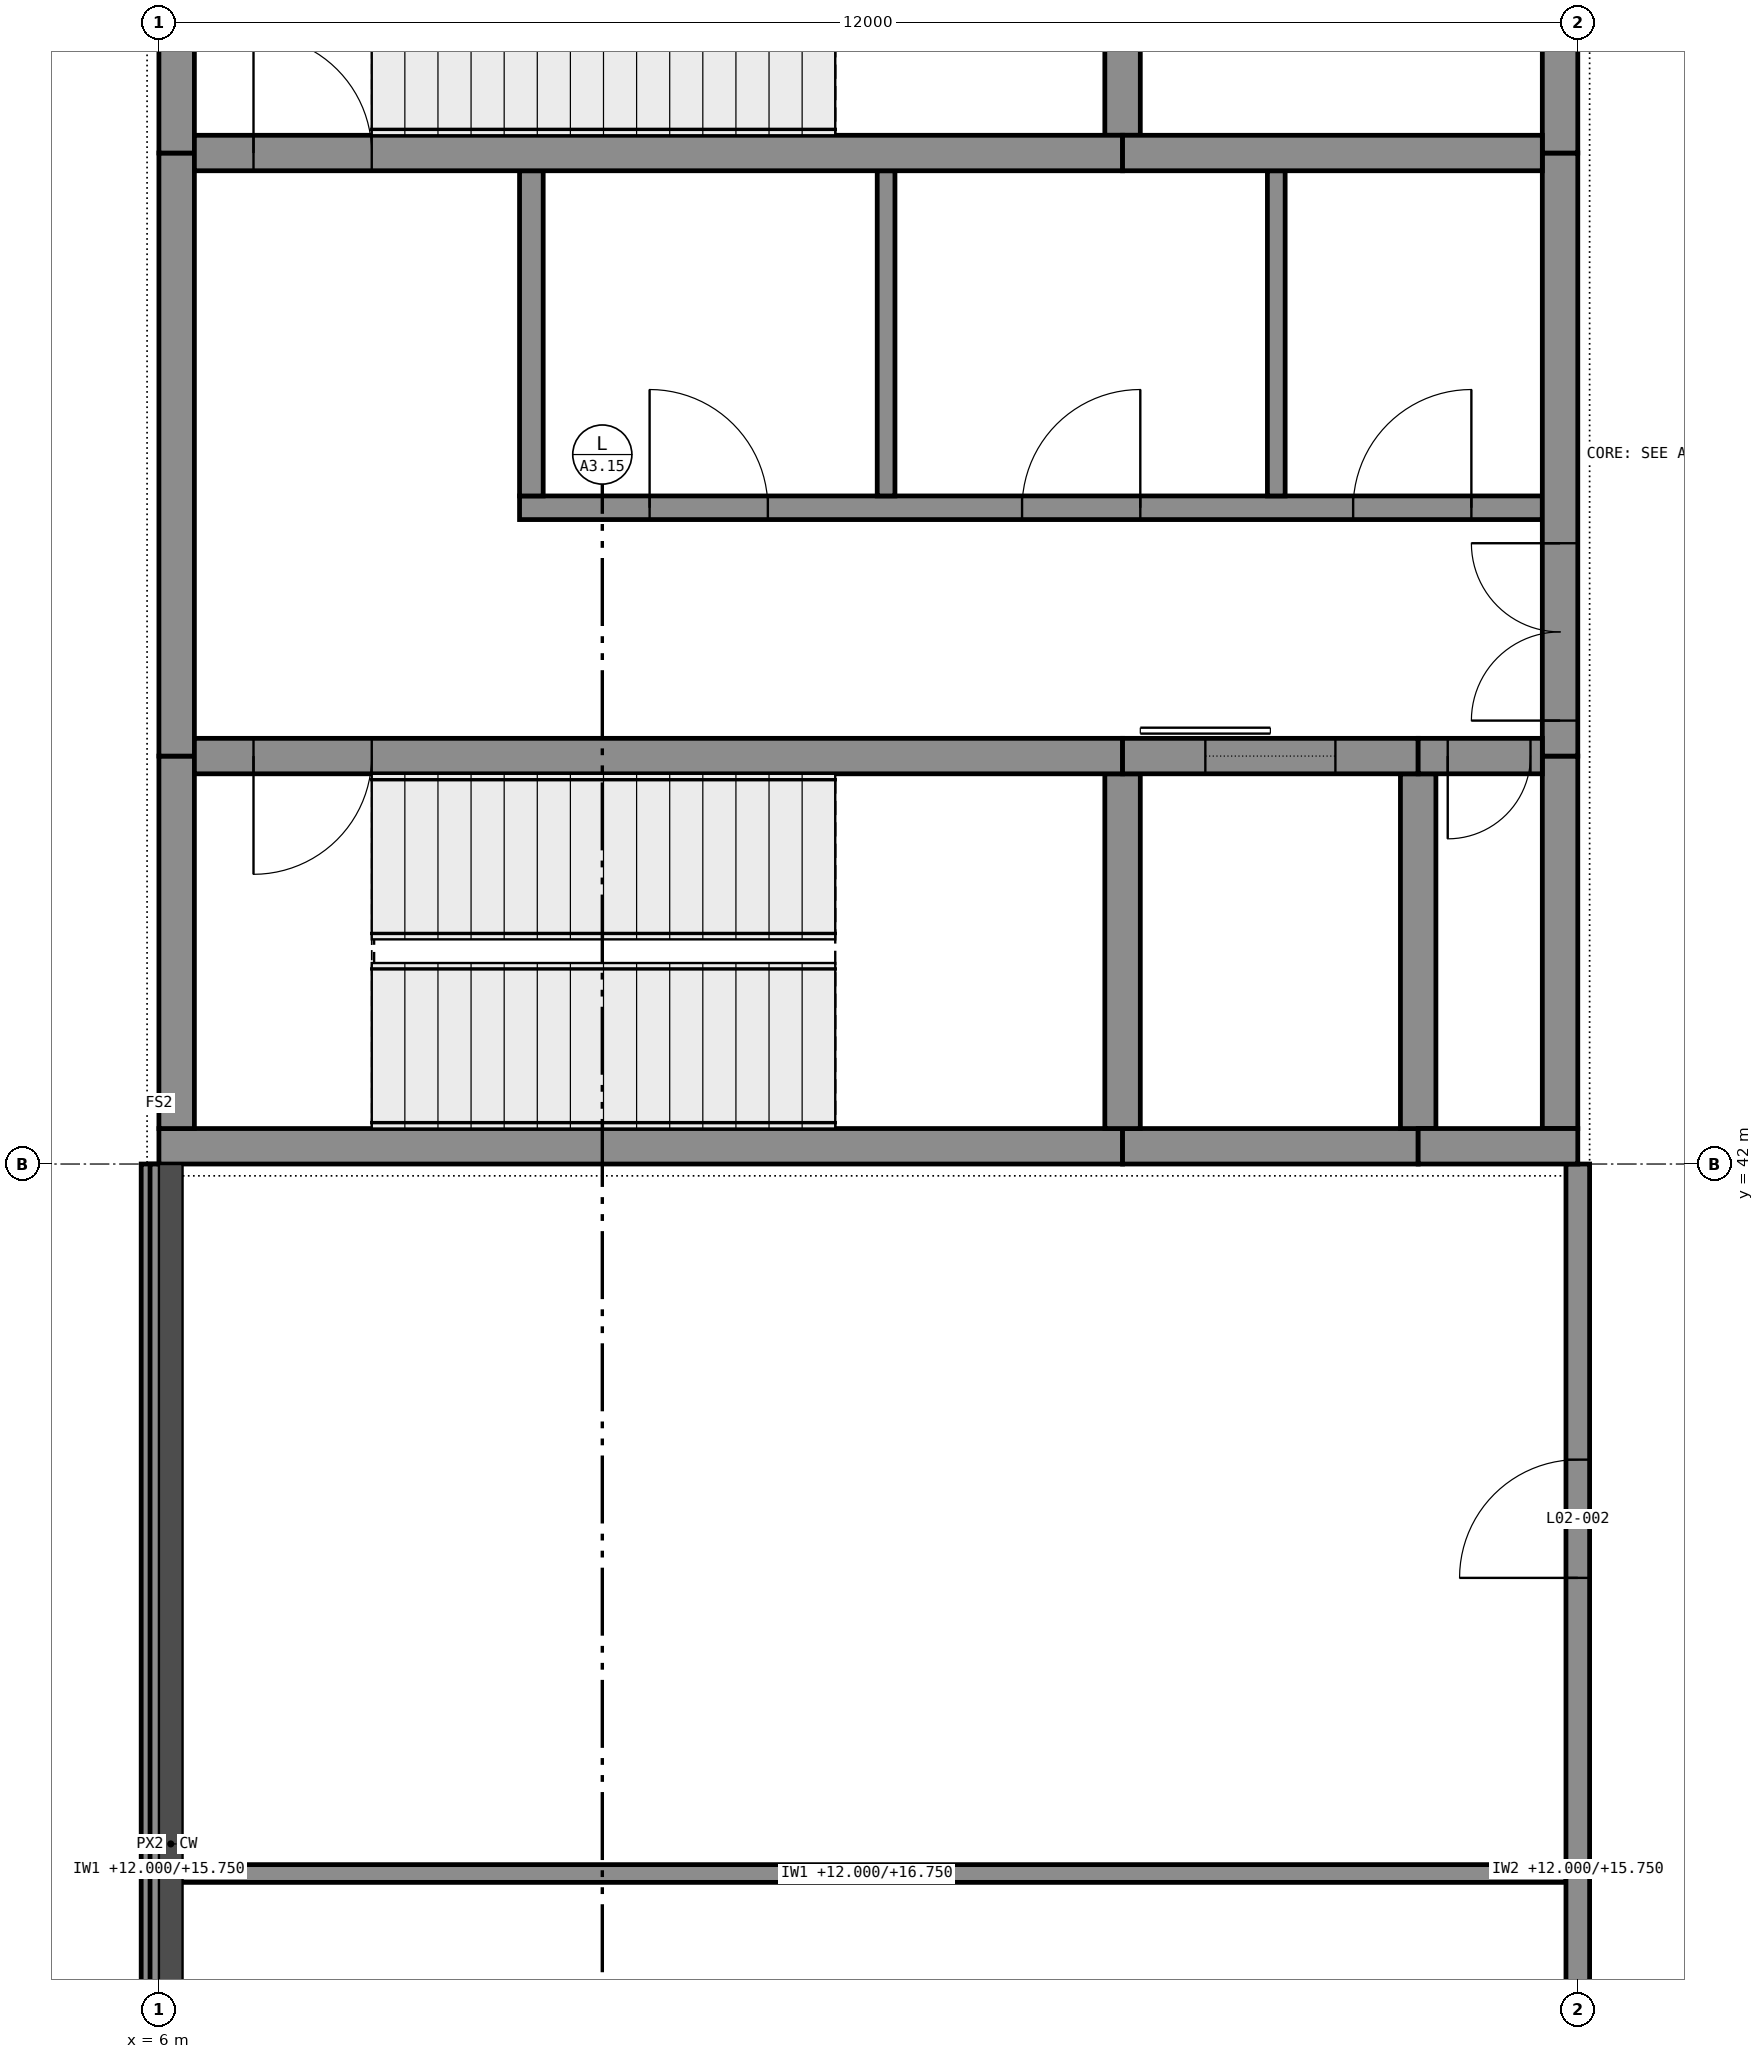
"""IFC4 building model, lengths in metres.
Left out: names, types, materials, properties, quantities, classifications, styles, units other than length and angle.
Written with IfcOpenShell. Run it as: python <this file> out.ifc"""

import sys

from ifc_helpers import new_model, si_unit, direction, frame, frame_2d, origin, place, context, subcontext, project, spatial, rectangle, extrude, element, fill, save


model = new_model("IFC4")
c1 = context("Model", 3, precision=1e-05, world=origin(), true_north=direction((0.0, 1.0)))
c2 = subcontext(c1, "Body", "Model", "MODEL_VIEW")
j1 = project(units=[si_unit("LENGTHUNIT", "METRE"), si_unit("PLANEANGLEUNIT", "RADIAN")], contexts=[c1])
p1 = place(None, origin())
s1 = spatial("IfcSite", under=j1, at=p1, CompositionType="ELEMENT")
p2 = place(p1, origin())
s2 = spatial("IfcBuilding", under=s1, at=p2, CompositionType="ELEMENT")
p3 = place(p2, frame((0.0, 0.0, 12.0)))
s3 = spatial("IfcBuildingStorey", under=s2, at=p3, CompositionType="ELEMENT", Elevation=12.0)
p4 = place(p3, frame((6.0, 42.15, 0.0), z_axis=(0.0, 0.0, 1.0), x_axis=(1.0, 0.0, 0.0)))
e1 = element("IfcWall", 1, at=p4, inside=s3, PredefinedType="SHEAR", context=c2, shape_type="SweptSolid", body=[
    extrude(rectangle(XDim=8.15, YDim=0.3, at=frame_2d((4.075, 0.0))), origin(), (0.0, 0.0, 1.0), 4.75),
])
p5 = place(p3, frame((14.15, 42.15, 0.0), z_axis=(0.0, 0.0, 1.0), x_axis=(1.0, 0.0, 0.0)))
e2 = element("IfcWall", 2, at=p5, inside=s3, PredefinedType="SHEAR", context=c2, shape_type="SweptSolid", body=[
    extrude(rectangle(XDim=2.5, YDim=0.3, at=frame_2d((1.25, 0.0))), origin(), (0.0, 0.0, 1.0), 4.75),
])
p6 = place(p3, frame((16.65, 42.15, 0.0), z_axis=(0.0, 0.0, 1.0), x_axis=(1.0, 0.0, 0.0)))
e3 = element("IfcWall", 3, at=p6, inside=s3, PredefinedType="SHEAR", context=c2, shape_type="SweptSolid", body=[
    extrude(rectangle(XDim=1.35, YDim=0.3, at=frame_2d((0.675, 0.0))), origin(), (0.0, 0.0, 1.0), 4.75),
])
p7 = place(p3, frame((6.3, 45.45, 0.0), z_axis=(0.0, 0.0, 1.0), x_axis=(1.0, 0.0, 0.0)))
e4 = element("IfcWall", 4, at=p7, inside=s3, PredefinedType="SHEAR", context=c2, shape_type="SweptSolid", body=[
    extrude(rectangle(XDim=7.85, YDim=0.3, at=frame_2d((3.925, 0.0))), origin(), (0.0, 0.0, 1.0), 4.75),
])
p8 = place(p7, frame((0.5, 0.0, 0.0)))
e5 = element("IfcOpeningElement", 5, at=p8, cuts=e4, PredefinedType="OPENING", context=c2, shape_type="SweptSolid", body=[
    extrude(rectangle(XDim=1.0, YDim=2.1, at=frame_2d((0.5, 1.05))), frame((0.0, 0.16, 0.0), z_axis=(0.0, -1.0, 0.0), x_axis=(1.0, 0.0, 0.0)), (0.0, 0.0, 1.0), 0.32),
])
p9 = place(p3, frame((14.15, 45.45, 0.0), z_axis=(0.0, 0.0, 1.0), x_axis=(1.0, 0.0, 0.0)))
e6 = element("IfcWall", 6, at=p9, inside=s3, PredefinedType="SHEAR", context=c2, shape_type="SweptSolid", body=[
    extrude(rectangle(XDim=2.5, YDim=0.3, at=frame_2d((1.25, 0.0))), origin(), (0.0, 0.0, 1.0), 4.75),
])
p10 = place(p9, frame((0.7, 0.0, 0.0)))
e7 = element("IfcOpeningElement", 7, at=p10, cuts=e6, PredefinedType="OPENING", context=c2, shape_type="SweptSolid", body=[
    extrude(rectangle(XDim=1.1, YDim=2.1, at=frame_2d((0.55, 1.05))), frame((0.0, 0.16, 0.0), z_axis=(0.0, -1.0, 0.0), x_axis=(1.0, 0.0, 0.0)), (0.0, 0.0, 1.0), 0.32),
])
p11 = place(p3, frame((16.65, 45.45, 0.0), z_axis=(0.0, 0.0, 1.0), x_axis=(1.0, 0.0, 0.0)))
e8 = element("IfcWall", 8, at=p11, inside=s3, PredefinedType="SHEAR", context=c2, shape_type="SweptSolid", body=[
    extrude(rectangle(XDim=1.05, YDim=0.3, at=frame_2d((0.525, 0.0))), origin(), (0.0, 0.0, 1.0), 4.75),
])
p12 = place(p11, frame((0.25, 0.0, 0.0)))
e9 = element("IfcOpeningElement", 9, at=p12, cuts=e8, PredefinedType="OPENING", context=c2, shape_type="SweptSolid", body=[
    extrude(rectangle(XDim=0.7, YDim=2.1, at=frame_2d((0.35, 1.05))), frame((0.0, 0.16, 0.0), z_axis=(0.0, -1.0, 0.0), x_axis=(1.0, 0.0, 0.0)), (0.0, 0.0, 1.0), 0.32),
])
p13 = place(p3, frame((6.3, 50.55, 0.0), z_axis=(0.0, 0.0, 1.0), x_axis=(1.0, 0.0, 0.0)))
e10 = element("IfcWall", 10, at=p13, inside=s3, PredefinedType="SHEAR", context=c2, shape_type="SweptSolid", body=[
    extrude(rectangle(XDim=7.85, YDim=0.3, at=frame_2d((3.925, 0.0))), origin(), (0.0, 0.0, 1.0), 4.75),
])
p14 = place(p13, frame((0.5, 0.0, 0.0)))
e11 = element("IfcOpeningElement", 11, at=p14, cuts=e10, PredefinedType="OPENING", context=c2, shape_type="SweptSolid", body=[
    extrude(rectangle(XDim=1.0, YDim=2.1, at=frame_2d((0.5, 1.05))), frame((0.0, 0.16, 0.0), z_axis=(0.0, -1.0, 0.0), x_axis=(1.0, 0.0, 0.0)), (0.0, 0.0, 1.0), 0.32),
])
p15 = place(p3, frame((14.15, 50.55, 0.0), z_axis=(0.0, 0.0, 1.0), x_axis=(1.0, 0.0, 0.0)))
e12 = element("IfcWall", 12, at=p15, inside=s3, PredefinedType="SHEAR", context=c2, shape_type="SweptSolid", body=[
    extrude(rectangle(XDim=3.55, YDim=0.3, at=frame_2d((1.775, 0.0))), origin(), (0.0, 0.0, 1.0), 4.75),
])
p16 = place(p3, frame((6.15, 42.3, 0.0), z_axis=(0.0, 0.0, 1.0), x_axis=(0.0, 1.0, 0.0)))
e13 = element("IfcWall", 13, at=p16, inside=s3, PredefinedType="SHEAR", context=c2, shape_type="SweptSolid", body=[
    extrude(rectangle(XDim=3.15, YDim=0.3, at=frame_2d((1.575, 0.0))), origin(), (0.0, 0.0, 1.0), 4.75),
])
p17 = place(p3, frame((6.15, 45.45, 0.0), z_axis=(0.0, 0.0, 1.0), x_axis=(0.0, 1.0, 0.0)))
e14 = element("IfcWall", 14, at=p17, inside=s3, PredefinedType="SHEAR", context=c2, shape_type="SweptSolid", body=[
    extrude(rectangle(XDim=5.1, YDim=0.3, at=frame_2d((2.55, 0.0))), origin(), (0.0, 0.0, 1.0), 4.75),
])
p18 = place(p3, frame((6.15, 50.55, 0.0), z_axis=(0.0, 0.0, 1.0), x_axis=(0.0, 1.0, 0.0)))
e15 = element("IfcWall", 15, at=p18, inside=s3, PredefinedType="SHEAR", context=c2, shape_type="SweptSolid", body=[
    extrude(rectangle(XDim=3.45, YDim=0.3, at=frame_2d((1.725, 0.0))), origin(), (0.0, 0.0, 1.0), 4.75),
])
p19 = place(p3, frame((17.85, 42.3, 0.0), z_axis=(0.0, 0.0, 1.0), x_axis=(0.0, 1.0, 0.0)))
e16 = element("IfcWall", 16, at=p19, inside=s3, PredefinedType="SHEAR", context=c2, shape_type="SweptSolid", body=[
    extrude(rectangle(XDim=3.15, YDim=0.3, at=frame_2d((1.575, 0.0))), origin(), (0.0, 0.0, 1.0), 4.75),
])
p20 = place(p3, frame((17.85, 45.45, 0.0), z_axis=(0.0, 0.0, 1.0), x_axis=(0.0, 1.0, 0.0)))
e17 = element("IfcWall", 17, at=p20, inside=s3, PredefinedType="SHEAR", context=c2, shape_type="SweptSolid", body=[
    extrude(rectangle(XDim=5.1, YDim=0.3, at=frame_2d((2.55, 0.0))), origin(), (0.0, 0.0, 1.0), 4.75),
])
p21 = place(p20, frame((0.3, 0.0, 0.0)))
e18 = element("IfcOpeningElement", 18, at=p21, cuts=e17, PredefinedType="OPENING", context=c2, shape_type="SweptSolid", body=[
    extrude(rectangle(XDim=1.5, YDim=2.1, at=frame_2d((0.75, 1.05))), frame((0.0, 0.16, 0.0), z_axis=(0.0, -1.0, 0.0), x_axis=(1.0, 0.0, 0.0)), (0.0, 0.0, 1.0), 0.32),
])
p22 = place(p3, frame((17.85, 50.55, 0.0), z_axis=(0.0, 0.0, 1.0), x_axis=(0.0, 1.0, 0.0)))
e19 = element("IfcWall", 19, at=p22, inside=s3, PredefinedType="SHEAR", context=c2, shape_type="SweptSolid", body=[
    extrude(rectangle(XDim=3.15, YDim=0.3, at=frame_2d((1.575, 0.0))), origin(), (0.0, 0.0, 1.0), 4.75),
])
p23 = place(p22, frame((1.15, 0.0, 0.0)))
e20 = element("IfcOpeningElement", 20, at=p23, cuts=e19, PredefinedType="OPENING", context=c2, shape_type="SweptSolid", body=[
    extrude(rectangle(XDim=1.0, YDim=2.1, at=frame_2d((0.5, 1.05))), frame((0.0, 0.16, 0.0), z_axis=(0.0, -1.0, 0.0), x_axis=(1.0, 0.0, 0.0)), (0.0, 0.0, 1.0), 0.32),
])
p24 = place(p3, frame((14.15, 42.3, 0.0), z_axis=(0.0, 0.0, 1.0), x_axis=(0.0, 1.0, 0.0)))
e21 = element("IfcWall", 21, at=p24, inside=s3, PredefinedType="SHEAR", context=c2, shape_type="SweptSolid", body=[
    extrude(rectangle(XDim=3.0, YDim=0.3, at=frame_2d((1.5, 0.0))), origin(), (0.0, 0.0, 1.0), 4.75),
])
p25 = place(p3, frame((14.15, 50.7, 0.0), z_axis=(0.0, 0.0, 1.0), x_axis=(0.0, 1.0, 0.0)))
e22 = element("IfcWall", 22, at=p25, inside=s3, PredefinedType="SHEAR", context=c2, shape_type="SweptSolid", body=[
    extrude(rectangle(XDim=3.3, YDim=0.3, at=frame_2d((1.65, 0.0))), origin(), (0.0, 0.0, 1.0), 4.75),
])
p26 = place(p3, frame((16.65, 42.3, 0.0), z_axis=(0.0, 0.0, 1.0), x_axis=(0.0, 1.0, 0.0)))
e23 = element("IfcWall", 23, at=p26, inside=s3, PredefinedType="SHEAR", context=c2, shape_type="SweptSolid", body=[
    extrude(rectangle(XDim=3.0, YDim=0.3, at=frame_2d((1.5, 0.0))), origin(), (0.0, 0.0, 1.0), 4.75),
])
p27 = place(p3, frame((5.925, 42.0, 4.75), z_axis=(0.0, 0.0, 1.0), x_axis=(0.0, -1.0, 0.0)))
e24 = element("IfcWall", 24, at=p27, inside=s3, PredefinedType="STANDARD", context=c2, shape_type="SweptSolid", body=[
    extrude(rectangle(XDim=11.5, YDim=0.15, at=frame_2d((5.75, 0.0))), origin(), (0.0, 0.0, 1.0), 0.25),
])
p28 = place(p3, frame((6.075, 36.0, 0.0), z_axis=(0.0, 0.0, 1.0), x_axis=(1.0, 0.0, 0.0)))
e25 = element("IfcWall", 25, at=p28, inside=s3, PredefinedType="PARTITIONING", context=c2, shape_type="SweptSolid", body=[
    extrude(rectangle(XDim=11.825, YDim=0.15, at=frame_2d((5.913, 0.0))), origin(), (0.0, 0.0, 1.0), 4.75),
])
p29 = place(p3, frame((9.05, 47.55, 0.0), z_axis=(0.0, 0.0, 1.0), x_axis=(1.0, 0.0, 0.0)))
e26 = element("IfcWall", 26, at=p29, inside=s3, PredefinedType="PARTITIONING", context=c2, shape_type="SweptSolid", body=[
    extrude(rectangle(XDim=8.65, YDim=0.2, at=frame_2d((4.325, 0.0))), origin(), (0.0, 0.0, 1.0), 4.75),
])
p30 = place(p29, frame((1.1, 0.0, 0.0)))
e27 = element("IfcOpeningElement", 27, at=p30, cuts=e26, PredefinedType="OPENING", context=c2, shape_type="SweptSolid", body=[
    extrude(rectangle(XDim=1.0, YDim=2.1, at=frame_2d((0.5, 1.05))), frame((0.0, 0.11, 0.0), z_axis=(0.0, -1.0, 0.0), x_axis=(1.0, 0.0, 0.0)), (0.0, 0.0, 1.0), 0.22),
])
p31 = place(p29, frame((4.25, 0.0, 0.0)))
e28 = element("IfcOpeningElement", 28, at=p31, cuts=e26, PredefinedType="OPENING", context=c2, shape_type="SweptSolid", body=[
    extrude(rectangle(XDim=1.0, YDim=2.1, at=frame_2d((0.5, 1.05))), frame((0.0, 0.11, 0.0), z_axis=(0.0, -1.0, 0.0), x_axis=(1.0, 0.0, 0.0)), (0.0, 0.0, 1.0), 0.22),
])
p32 = place(p29, frame((7.05, 0.0, 0.0)))
e29 = element("IfcOpeningElement", 29, at=p32, cuts=e26, PredefinedType="OPENING", context=c2, shape_type="SweptSolid", body=[
    extrude(rectangle(XDim=1.0, YDim=2.1, at=frame_2d((0.5, 1.05))), frame((0.0, 0.11, 0.0), z_axis=(0.0, -1.0, 0.0), x_axis=(1.0, 0.0, 0.0)), (0.0, 0.0, 1.0), 0.22),
])
p33 = place(p3, frame((6.0, 30.075, 0.0), z_axis=(0.0, 0.0, 1.0), x_axis=(0.0, 1.0, 0.0)))
e30 = element("IfcWall", 30, at=p33, inside=s3, PredefinedType="PARTITIONING", context=c2, shape_type="SweptSolid", body=[
    extrude(rectangle(XDim=11.925, YDim=0.15, at=frame_2d((5.962, 0.0))), origin(), (0.0, 0.0, 1.0), 3.75),
])
p34 = place(p3, frame((9.15, 47.65, 0.0), z_axis=(0.0, 0.0, 1.0), x_axis=(0.0, 1.0, 0.0)))
e31 = element("IfcWall", 31, at=p34, inside=s3, PredefinedType="PARTITIONING", context=c2, shape_type="SweptSolid", body=[
    extrude(rectangle(XDim=2.75, YDim=0.2, at=frame_2d((1.375, 0.0))), origin(), (0.0, 0.0, 1.0), 4.75),
])
for number, where, z_axis, x_axis in (
    (32, (12.15, 47.65, 0.0), (0.0, 0.0, 1.0), (0.0, 1.0, 0.0)),
    (33, (15.45, 47.65, 0.0), (0.0, 0.0, 1.0), (0.0, 1.0, 0.0)),
):
    element("IfcWall", number, at=place(p3, frame(where, z_axis=z_axis, x_axis=x_axis)), inside=s3, PredefinedType="PARTITIONING", context=c2, shape_type="SweptSolid", body=[
        extrude(rectangle(XDim=2.75, YDim=0.15, at=frame_2d((1.375, 0.0))), origin(), (0.0, 0.0, 1.0), 4.75),
    ])
p35 = place(p3, frame((18.0, 30.075, 0.0), z_axis=(0.0, 0.0, 1.0), x_axis=(0.0, 1.0, 0.0)))
e34 = element("IfcWall", 34, at=p35, inside=s3, PredefinedType="PARTITIONING", context=c2, shape_type="SweptSolid", body=[
    extrude(rectangle(XDim=11.925, YDim=0.2, at=frame_2d((5.962, 0.0))), origin(), (0.0, 0.0, 1.0), 3.75),
])
p36 = place(p35, frame((2.425, 0.0, 0.0)))
e35 = element("IfcOpeningElement", 35, at=p36, cuts=e34, PredefinedType="OPENING", context=c2, shape_type="SweptSolid", body=[
    extrude(rectangle(XDim=1.0, YDim=2.1, at=frame_2d((0.5, 1.05))), frame((0.0, 0.11, 0.0), z_axis=(0.0, -1.0, 0.0), x_axis=(1.0, 0.0, 0.0)), (0.0, 0.0, 1.0), 0.22),
])
p37 = place(p35, frame((8.425, 0.0, 0.0)))
e36 = element("IfcOpeningElement", 36, at=p37, cuts=e34, PredefinedType="OPENING", context=c2, shape_type="SweptSolid", body=[
    extrude(rectangle(XDim=1.0, YDim=2.1, at=frame_2d((0.5, 1.05))), frame((0.0, 0.11, 0.0), z_axis=(0.0, -1.0, 0.0), x_axis=(1.0, 0.0, 0.0)), (0.0, 0.0, 1.0), 0.22),
])
p38 = place(p37, origin())
e37 = element("IfcDoor", 37, at=p38, inside=s3, OperationType="SINGLE_SWING_RIGHT", PredefinedType="DOOR", context=c2, shape_type="SweptSolid", body=[
    extrude(rectangle(XDim=1.0, YDim=2.1, at=frame_2d((0.5, 1.05))), frame((0.0, 0.025, 0.0), z_axis=(0.0, -1.0, 0.0), x_axis=(1.0, 0.0, 0.0)), (0.0, 0.0, 1.0), 0.05),
])
fill(e36, e37)
p39 = place(p8, frame((1.0, 0.0, 0.0), z_axis=(0.0, 0.0, 1.0), x_axis=(-1.0, 0.0, 0.0)))
e38 = element("IfcDoor", 38, at=p39, inside=s3, OperationType="SINGLE_SWING_LEFT", PredefinedType="DOOR", context=c2, shape_type="SweptSolid", body=[
    extrude(rectangle(XDim=1.0, YDim=2.1, at=frame_2d((0.5, 1.05))), frame((0.0, 0.025, 0.0), z_axis=(0.0, -1.0, 0.0), x_axis=(1.0, 0.0, 0.0)), (0.0, 0.0, 1.0), 0.05),
])
fill(e5, e38)
p40 = place(p10, origin())
e39 = element("IfcDoor", 39, at=p40, inside=s3, OperationType="SLIDING_TO_LEFT", PredefinedType="DOOR", context=c2, shape_type="SweptSolid", body=[
    extrude(rectangle(XDim=1.1, YDim=2.1, at=frame_2d((0.55, 1.05))), frame((0.0, 0.025, 0.0), z_axis=(0.0, -1.0, 0.0), x_axis=(1.0, 0.0, 0.0)), (0.0, 0.0, 1.0), 0.05),
])
fill(e7, e39)
p41 = place(p12, frame((0.7, 0.0, 0.0), z_axis=(0.0, 0.0, 1.0), x_axis=(-1.0, 0.0, 0.0)))
e40 = element("IfcDoor", 40, at=p41, inside=s3, OperationType="SINGLE_SWING_LEFT", PredefinedType="DOOR", context=c2, shape_type="SweptSolid", body=[
    extrude(rectangle(XDim=0.7, YDim=2.1, at=frame_2d((0.35, 1.05))), frame((0.0, 0.025, 0.0), z_axis=(0.0, -1.0, 0.0), x_axis=(1.0, 0.0, 0.0)), (0.0, 0.0, 1.0), 0.05),
])
fill(e9, e40)
p42 = place(p21, origin())
e41 = element("IfcDoor", 41, at=p42, inside=s3, OperationType="DOUBLE_DOOR_SINGLE_SWING", PredefinedType="DOOR", context=c2, shape_type="SweptSolid", body=[
    extrude(rectangle(XDim=1.5, YDim=2.1, at=frame_2d((0.75, 1.05))), frame((0.0, 0.025, 0.0), z_axis=(0.0, -1.0, 0.0), x_axis=(1.0, 0.0, 0.0)), (0.0, 0.0, 1.0), 0.05),
])
fill(e18, e41)
p43 = place(p30, origin())
e42 = element("IfcDoor", 42, at=p43, inside=s3, OperationType="SINGLE_SWING_RIGHT", PredefinedType="DOOR", context=c2, shape_type="SweptSolid", body=[
    extrude(rectangle(XDim=1.0, YDim=2.1, at=frame_2d((0.5, 1.05))), frame((0.0, 0.025, 0.0), z_axis=(0.0, -1.0, 0.0), x_axis=(1.0, 0.0, 0.0)), (0.0, 0.0, 1.0), 0.05),
])
fill(e27, e42)
p44 = place(p31, origin())
e43 = element("IfcDoor", 43, at=p44, inside=s3, OperationType="SINGLE_SWING_LEFT", PredefinedType="DOOR", context=c2, shape_type="SweptSolid", body=[
    extrude(rectangle(XDim=1.0, YDim=2.1, at=frame_2d((0.5, 1.05))), frame((0.0, 0.025, 0.0), z_axis=(0.0, -1.0, 0.0), x_axis=(1.0, 0.0, 0.0)), (0.0, 0.0, 1.0), 0.05),
])
fill(e28, e43)
p45 = place(p32, origin())
e44 = element("IfcDoor", 44, at=p45, inside=s3, OperationType="SINGLE_SWING_LEFT", PredefinedType="DOOR", context=c2, shape_type="SweptSolid", body=[
    extrude(rectangle(XDim=1.0, YDim=2.1, at=frame_2d((0.5, 1.05))), frame((0.0, 0.025, 0.0), z_axis=(0.0, -1.0, 0.0), x_axis=(1.0, 0.0, 0.0)), (0.0, 0.0, 1.0), 0.05),
])
fill(e29, e44)
p46 = place(p14, origin())
e45 = element("IfcDoor", 45, at=p46, inside=s3, OperationType="SINGLE_SWING_RIGHT", PredefinedType="DOOR", context=c2, shape_type="SweptSolid", body=[
    extrude(rectangle(XDim=1.0, YDim=2.1, at=frame_2d((0.5, 1.05))), frame((0.0, 0.025, 0.0), z_axis=(0.0, -1.0, 0.0), x_axis=(1.0, 0.0, 0.0)), (0.0, 0.0, 1.0), 0.05),
])
fill(e11, e45)
save(model, sys.argv[1])
